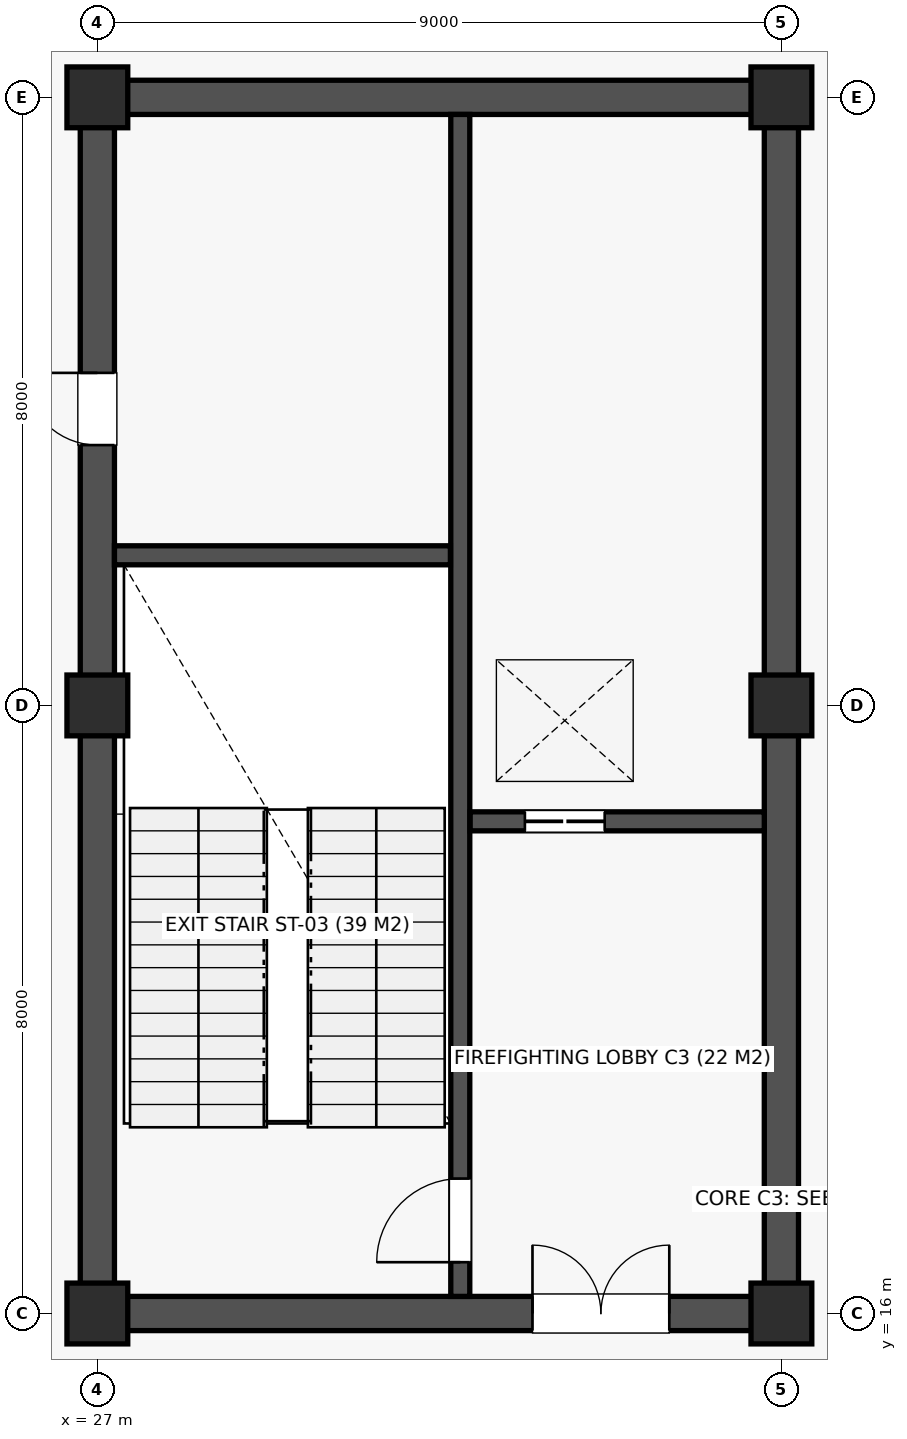
"""IFC4 building model, lengths in metres.
Left out: names, types, materials, properties, quantities, classifications, styles, units other than length and angle.
Written with IfcOpenShell. Run it as: python <this file> out.ifc"""

import sys

from ifc_helpers import new_model, si_unit, direction, frame, frame_2d, origin, origin_2d, place, context, subcontext, project, spatial, rectangle, extrude, element, fill, save


model = new_model("IFC4")
c1 = context("Model", 3, precision=1e-05, world=origin(), true_north=direction((0.0, 1.0)))
c2 = subcontext(c1, "Body", "Model", "MODEL_VIEW")
j1 = project(units=[si_unit("LENGTHUNIT", "METRE"), si_unit("PLANEANGLEUNIT", "RADIAN")], contexts=[c1])
p1 = place(None, origin())
s1 = spatial("IfcSite", under=j1, at=p1, CompositionType="ELEMENT")
p2 = place(p1, origin())
s2 = spatial("IfcBuilding", under=s1, at=p2, CompositionType="ELEMENT")
p3 = place(p2, frame((0.0, 0.0, 9.0)))
s3 = spatial("IfcBuildingStorey", under=s2, at=p3, CompositionType="ELEMENT", Elevation=9.0)
for number, where, z_axis, x_axis in (
    (1, (27.0, 16.0, 0.0), (0.0, 0.0, 1.0), (1.0, 0.0, 0.0)),
    (2, (27.0, 24.0, 0.0), (0.0, 0.0, 1.0), (1.0, 0.0, 0.0)),
    (3, (27.0, 32.0, 0.0), (0.0, 0.0, 1.0), (1.0, 0.0, 0.0)),
    (4, (36.0, 16.0, 0.0), (0.0, 0.0, 1.0), (1.0, 0.0, 0.0)),
    (5, (36.0, 24.0, 0.0), (0.0, 0.0, 1.0), (1.0, 0.0, 0.0)),
    (6, (36.0, 32.0, 0.0), (0.0, 0.0, 1.0), (1.0, 0.0, 0.0)),
):
    element("IfcColumn", number, at=place(p3, frame(where, z_axis=z_axis, x_axis=x_axis)), inside=s3, PredefinedType="COLUMN", context=c2, shape_type="SweptSolid", body=[
        extrude(rectangle(XDim=0.8, YDim=0.8, at=origin_2d()), origin(), (0.0, 0.0, 1.0), 4.5),
    ])
p4 = place(p3, frame((27.225, 16.0, 0.0), z_axis=(0.0, 0.0, 1.0), x_axis=(1.0, 0.0, 0.0)))
e7 = element("IfcWall", 7, at=p4, inside=s3, PredefinedType="SHEAR", context=c2, shape_type="SweptSolid", body=[
    extrude(rectangle(XDim=8.55, YDim=0.45, at=frame_2d((4.275, 0.0))), origin(), (0.0, 0.0, 1.0), 4.14),
])
p5 = place(p4, frame((5.5, 0.0, 0.0)))
e8 = element("IfcOpeningElement", 8, at=p5, cuts=e7, PredefinedType="OPENING", context=c2, shape_type="SweptSolid", body=[
    extrude(rectangle(XDim=1.8, YDim=2.18, at=frame_2d((0.9, 1.09))), frame((0.0, 0.237, 0.0), z_axis=(0.0, -1.0, 0.0), x_axis=(1.0, 0.0, 0.0)), (0.0, 0.0, 1.0), 0.474),
])
p6 = place(p3, frame((27.225, 32.0, 0.0), z_axis=(0.0, 0.0, 1.0), x_axis=(1.0, 0.0, 0.0)))
e9 = element("IfcWall", 9, at=p6, inside=s3, PredefinedType="SHEAR", context=c2, shape_type="SweptSolid", body=[
    extrude(rectangle(XDim=8.55, YDim=0.45, at=frame_2d((4.275, 0.0))), origin(), (0.0, 0.0, 1.0), 4.14),
])
p7 = place(p3, frame((27.0, 16.225, 0.0), z_axis=(0.0, 0.0, 1.0), x_axis=(0.0, 1.0, 0.0)))
e10 = element("IfcWall", 10, at=p7, inside=s3, PredefinedType="SHEAR", context=c2, shape_type="SweptSolid", body=[
    extrude(rectangle(XDim=15.55, YDim=0.45, at=frame_2d((7.775, 0.0))), origin(), (0.0, 0.0, 1.0), 4.14),
])
p8 = place(p7, frame((11.2, 0.0, 0.0)))
e11 = element("IfcOpeningElement", 11, at=p8, cuts=e10, PredefinedType="OPENING", context=c2, shape_type="SweptSolid", body=[
    extrude(rectangle(XDim=0.95, YDim=2.1, at=frame_2d((0.475, 1.05))), frame((0.0, 0.237, 0.0), z_axis=(0.0, -1.0, 0.0), x_axis=(1.0, 0.0, 0.0)), (0.0, 0.0, 1.0), 0.474),
])
p9 = place(p3, frame((36.0, 16.225, 0.0), z_axis=(0.0, 0.0, 1.0), x_axis=(0.0, 1.0, 0.0)))
e12 = element("IfcWall", 12, at=p9, inside=s3, PredefinedType="SHEAR", context=c2, shape_type="SweptSolid", body=[
    extrude(rectangle(XDim=15.55, YDim=0.45, at=frame_2d((7.775, 0.0))), origin(), (0.0, 0.0, 1.0), 4.14),
])
p10 = place(p3, frame((31.775, 16.225, 0.0), z_axis=(0.0, 0.0, 1.0), x_axis=(0.0, 1.0, 0.0)))
e13 = element("IfcWall", 13, at=p10, inside=s3, PredefinedType="SOLIDWALL", context=c2, shape_type="SweptSolid", body=[
    extrude(rectangle(XDim=15.55, YDim=0.25, at=frame_2d((7.775, 0.0))), origin(), (0.0, 0.0, 1.0), 4.14),
])
p11 = place(p10, frame((0.45, 0.0, 0.0)))
e14 = element("IfcOpeningElement", 14, at=p11, cuts=e13, PredefinedType="OPENING", context=c2, shape_type="SweptSolid", body=[
    extrude(rectangle(XDim=1.1, YDim=2.15, at=frame_2d((0.55, 1.075))), frame((0.0, 0.137, 0.0), z_axis=(0.0, -1.0, 0.0), x_axis=(1.0, 0.0, 0.0)), (0.0, 0.0, 1.0), 0.274),
])
p12 = place(p3, frame((27.225, 25.975, 0.0), z_axis=(0.0, 0.0, 1.0), x_axis=(1.0, 0.0, 0.0)))
e15 = element("IfcWall", 15, at=p12, inside=s3, PredefinedType="SOLIDWALL", context=c2, shape_type="SweptSolid", body=[
    extrude(rectangle(XDim=4.42, YDim=0.25, at=frame_2d((2.21, 0.0))), origin(), (0.0, 0.0, 1.0), 4.14),
])
p13 = place(p3, frame((31.905, 22.475, 0.0), z_axis=(0.0, 0.0, 1.0), x_axis=(1.0, 0.0, 0.0)))
e16 = element("IfcWall", 16, at=p13, inside=s3, PredefinedType="SOLIDWALL", context=c2, shape_type="SweptSolid", body=[
    extrude(rectangle(XDim=3.87, YDim=0.25, at=frame_2d((1.935, 0.0))), origin(), (0.0, 0.0, 1.0), 4.14),
])
p14 = place(p13, frame((0.72, 0.0, 0.0)))
e17 = element("IfcOpeningElement", 17, at=p14, cuts=e16, PredefinedType="OPENING", context=c2, shape_type="SweptSolid", body=[
    extrude(rectangle(XDim=1.05, YDim=2.12, at=frame_2d((0.525, 1.06))), frame((0.0, 0.137, 0.0), z_axis=(0.0, -1.0, 0.0), x_axis=(1.0, 0.0, 0.0)), (0.0, 0.0, 1.0), 0.274),
])
p15 = place(p5, origin())
e18 = element("IfcDoor", 18, at=p15, inside=s3, OperationType="DOUBLE_DOOR_SINGLE_SWING", PredefinedType="DOOR", context=c2, shape_type="SweptSolid", body=[
    extrude(rectangle(XDim=1.8, YDim=2.18, at=frame_2d((0.9, 1.09))), frame((0.0, 0.025, 0.0), z_axis=(0.0, -1.0, 0.0), x_axis=(1.0, 0.0, 0.0)), (0.0, 0.0, 1.0), 0.05),
])
fill(e8, e18)
p16 = place(p11, origin())
e19 = element("IfcDoor", 19, at=p16, inside=s3, OperationType="SINGLE_SWING_LEFT", PredefinedType="DOOR", context=c2, shape_type="SweptSolid", body=[
    extrude(rectangle(XDim=1.1, YDim=2.15, at=frame_2d((0.55, 1.075))), frame((0.0, 0.025, 0.0), z_axis=(0.0, -1.0, 0.0), x_axis=(1.0, 0.0, 0.0)), (0.0, 0.0, 1.0), 0.05),
])
fill(e14, e19)
p17 = place(p8, origin())
e20 = element("IfcDoor", 20, at=p17, inside=s3, OperationType="SINGLE_SWING_RIGHT", PredefinedType="DOOR", context=c2, shape_type="SweptSolid", body=[
    extrude(rectangle(XDim=0.95, YDim=2.1, at=frame_2d((0.475, 1.05))), frame((0.0, 0.025, 0.0), z_axis=(0.0, -1.0, 0.0), x_axis=(1.0, 0.0, 0.0)), (0.0, 0.0, 1.0), 0.05),
])
fill(e11, e20)
p18 = place(p14, origin())
e21 = element("IfcDoor", 21, at=p18, inside=s3, OperationType="DOUBLE_DOOR_SLIDING", PredefinedType="DOOR", context=c2, shape_type="SweptSolid", body=[
    extrude(rectangle(XDim=1.05, YDim=2.12, at=frame_2d((0.525, 1.06))), frame((0.0, 0.025, 0.0), z_axis=(0.0, -1.0, 0.0), x_axis=(1.0, 0.0, 0.0)), (0.0, 0.0, 1.0), 0.05),
])
fill(e17, e21)
save(model, sys.argv[1])
